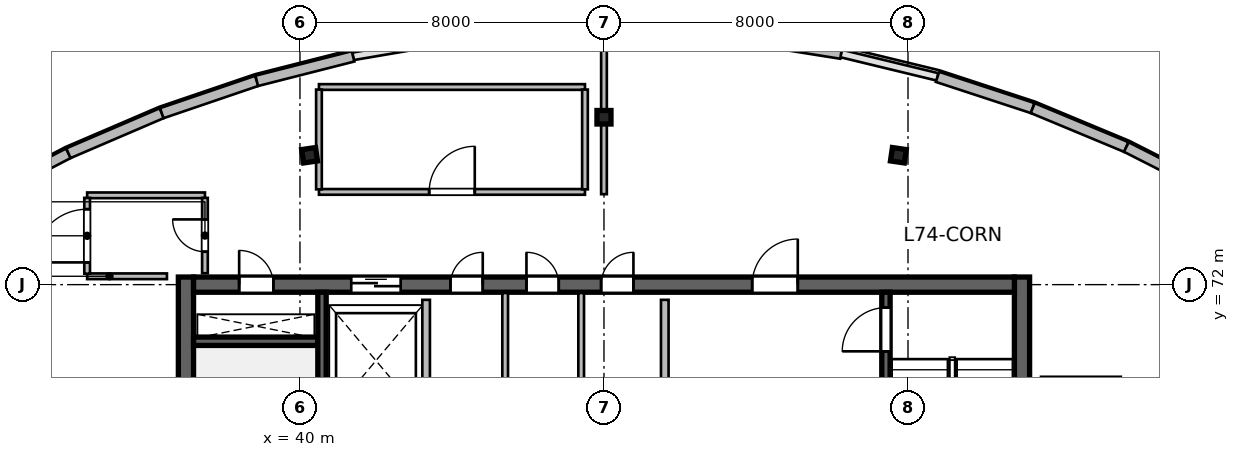
"""IFC4 building model, lengths in metres.
Left out: names, types, materials, properties, quantities, classifications, styles, units other than length and angle.
Written with IfcOpenShell. Run it as: python <this file> out.ifc"""

import sys

from ifc_helpers import new_model, si_unit, direction, frame, frame_2d, origin, origin_2d, place, context, subcontext, project, spatial, rectangle, i_section, extrude, source, transform, mapped, element, fill, save


model = new_model("IFC4")
c1 = context("Model", 3, precision=1e-05, world=origin(), true_north=direction((0.0, 1.0)))
c2 = subcontext(c1, "Body", "Model", "MODEL_VIEW")
j1 = project(units=[si_unit("LENGTHUNIT", "METRE"), si_unit("PLANEANGLEUNIT", "RADIAN")], contexts=[c1])
p1 = place(None, origin())
s1 = spatial("IfcSite", under=j1, at=p1, CompositionType="ELEMENT")
p2 = place(p1, origin())
s2 = spatial("IfcBuilding", under=s1, at=p2, CompositionType="ELEMENT")
p3 = place(p2, frame((0.0, 0.0, 303.0)))
s3 = spatial("IfcBuildingStorey", under=s2, at=p3, CompositionType="ELEMENT", Elevation=303.0)
m1 = source(origin(), c2, "Body", "SweptSolid", [
    extrude(rectangle(XDim=12.0, YDim=0.4, at=frame_2d((6.0, 0.0))), origin(), (0.0, 0.0, 1.0), 4.8),
])
for number, where, z_axis, x_axis in (
    (1, (37.0, 60.2, 0.0), (0.0, 0.0, 1.0), (0.0, 1.0, 0.0)),
    (2, (59.0, 60.2, 0.0), (0.0, 0.0, 1.0), (0.0, 1.0, 0.0)),
):
    element("IfcWall", number, at=place(p3, frame(where, z_axis=z_axis, x_axis=x_axis)), inside=s3, PredefinedType="SHEAR", context=c2, shape_type="MappedRepresentation", body=[
        mapped(m1, transform((0.0, 0.0, 0.0), scale=1.0)),
    ])
m2 = source(origin(), c2, "Body", "SweptSolid", [
    extrude(rectangle(XDim=21.6, YDim=0.4, at=frame_2d((10.8, 0.0))), origin(), (0.0, 0.0, 1.0), 4.8),
])
p4 = place(p3, frame((37.2, 72.0, 0.0), z_axis=(0.0, 0.0, 1.0), x_axis=(1.0, 0.0, 0.0)))
e3 = element("IfcWall", 3, at=p4, inside=s3, PredefinedType="SHEAR", context=c2, shape_type="MappedRepresentation", body=[
    mapped(m2, transform((0.0, 0.0, 0.0), scale=1.0)),
])
p5 = place(p4, frame((1.2, 0.0, 0.0)))
e4 = element("IfcOpeningElement", 4, at=p5, cuts=e3, PredefinedType="OPENING", context=c2, shape_type="SweptSolid", body=[
    extrude(rectangle(XDim=0.9, YDim=2.1, at=frame_2d((0.45, 1.05))), frame((0.0, 0.21, 0.0), z_axis=(0.0, -1.0, 0.0), x_axis=(1.0, 0.0, 0.0)), (0.0, 0.0, 1.0), 0.42),
])
p6 = place(p4, frame((14.7, 0.0, 0.0)))
e5 = element("IfcOpeningElement", 5, at=p6, cuts=e3, PredefinedType="OPENING", context=c2, shape_type="SweptSolid", body=[
    extrude(rectangle(XDim=1.2, YDim=2.15, at=frame_2d((0.6, 1.075))), frame((0.0, 0.21, 0.0), z_axis=(0.0, -1.0, 0.0), x_axis=(1.0, 0.0, 0.0)), (0.0, 0.0, 1.0), 0.42),
])
p7 = place(p4, frame((4.15, 0.0, 0.0)))
e6 = element("IfcOpeningElement", 6, at=p7, cuts=e3, PredefinedType="OPENING", context=c2, shape_type="SweptSolid", body=[
    extrude(rectangle(XDim=1.3, YDim=2.15, at=frame_2d((0.65, 1.075))), frame((0.0, 0.21, 0.0), z_axis=(0.0, -1.0, 0.0), x_axis=(1.0, 0.0, 0.0)), (0.0, 0.0, 1.0), 0.42),
])
p8 = place(p4, frame((6.76, 0.0, 0.0)))
e7 = element("IfcOpeningElement", 7, at=p8, cuts=e3, PredefinedType="OPENING", context=c2, shape_type="SweptSolid", body=[
    extrude(rectangle(XDim=0.85, YDim=2.1, at=frame_2d((0.425, 1.05))), frame((0.0, 0.21, 0.0), z_axis=(0.0, -1.0, 0.0), x_axis=(1.0, 0.0, 0.0)), (0.0, 0.0, 1.0), 0.42),
])
p9 = place(p4, frame((8.76, 0.0, 0.0)))
e8 = element("IfcOpeningElement", 8, at=p9, cuts=e3, PredefinedType="OPENING", context=c2, shape_type="SweptSolid", body=[
    extrude(rectangle(XDim=0.85, YDim=2.1, at=frame_2d((0.425, 1.05))), frame((0.0, 0.21, 0.0), z_axis=(0.0, -1.0, 0.0), x_axis=(1.0, 0.0, 0.0)), (0.0, 0.0, 1.0), 0.42),
])
p10 = place(p4, frame((10.725, 0.0, 0.0)))
e9 = element("IfcOpeningElement", 9, at=p10, cuts=e3, PredefinedType="OPENING", context=c2, shape_type="SweptSolid", body=[
    extrude(rectangle(XDim=0.85, YDim=2.1, at=frame_2d((0.425, 1.05))), frame((0.0, 0.21, 0.0), z_axis=(0.0, -1.0, 0.0), x_axis=(1.0, 0.0, 0.0)), (0.0, 0.0, 1.0), 0.42),
])
m3 = source(origin(), c2, "Body", "SweptSolid", [
    extrude(rectangle(XDim=3.27, YDim=0.22, at=frame_2d((1.635, 0.0))), origin(), (0.0, 0.0, 1.0), 4.8),
])
p11 = place(p3, frame((37.2, 70.51, 0.0), z_axis=(0.0, 0.0, 1.0), x_axis=(1.0, 0.0, 0.0)))
e10 = element("IfcWall", 10, at=p11, inside=s3, PredefinedType="SHEAR", context=c2, shape_type="MappedRepresentation", body=[
    mapped(m3, transform((0.0, 0.0, 0.0), scale=1.0)),
])
m4 = source(origin(), c2, "Body", "SweptSolid", [
    extrude(rectangle(XDim=11.2, YDim=0.22, at=frame_2d((5.6, 0.0))), origin(), (0.0, 0.0, 1.0), 4.8),
])
p12 = place(p3, frame((40.58, 60.6, 0.0), z_axis=(0.0, 0.0, 1.0), x_axis=(0.0, 1.0, 0.0)))
e11 = element("IfcWall", 11, at=p12, inside=s3, PredefinedType="SHEAR", context=c2, shape_type="MappedRepresentation", body=[
    mapped(m4, transform((0.0, 0.0, 0.0), scale=1.0)),
])
p13 = place(p3, frame((55.42, 60.6, 0.0), z_axis=(0.0, 0.0, 1.0), x_axis=(0.0, 1.0, 0.0)))
e12 = element("IfcWall", 12, at=p13, inside=s3, PredefinedType="SHEAR", context=c2, shape_type="MappedRepresentation", body=[
    mapped(m4, transform((0.0, 0.0, 0.0), scale=1.0)),
])
p14 = place(p13, frame((9.645, 0.0, 0.0)))
e13 = element("IfcOpeningElement", 13, at=p14, cuts=e12, PredefinedType="OPENING", context=c2, shape_type="SweptSolid", body=[
    extrude(rectangle(XDim=1.15, YDim=2.15, at=frame_2d((0.575, 1.075))), frame((0.0, 0.12, 0.0), z_axis=(0.0, -1.0, 0.0), x_axis=(1.0, 0.0, 0.0)), (0.0, 0.0, 1.0), 0.24),
])
m5 = source(origin(), c2, "Body", "SweptSolid", [
    extrude(i_section(OverallWidth=0.369, OverallDepth=0.356, WebThickness=0.011, FlangeThickness=0.018, at=origin_2d()), origin(), (0.0, 0.0, 1.0), 4.8),
])
for number, where, z_axis, x_axis in (
    (14, (40.253, 75.404, 0.0), (0.0, 0.0, 1.0), (-0.143, 0.99, 0.0)),
    (15, (48.0, 76.404, 0.0), (0.0, 0.0, 1.0), (0.0, 1.0, 0.0)),
    (16, (55.747, 75.404, 0.0), (0.0, 0.0, 1.0), (0.143, 0.99, 0.0)),
):
    element("IfcColumn", number, at=place(p3, frame(where, z_axis=z_axis, x_axis=x_axis)), inside=s3, PredefinedType="COLUMN", context=c2, shape_type="MappedRepresentation", body=[
        mapped(m5, transform((0.0, 0.0, 0.0), scale=1.0)),
    ])
m6 = source(origin(), c2, "Body", "SweptSolid", [
    extrude(rectangle(XDim=2.711, YDim=0.28, at=frame_2d((1.356, 0.0))), origin(), (0.0, 0.0, 1.0), 4.54),
])
p15 = place(p3, frame((31.502, 74.205, 0.0), z_axis=(0.0, 0.0, 1.0), x_axis=(0.886828760751, 0.462098202881, 0.0)))
e17 = element("IfcWall", 17, at=p15, inside=s3, PredefinedType="SOLIDWALL", context=c2, shape_type="MappedRepresentation", body=[
    mapped(m6, transform((0.0, 0.0, 0.0), scale=1.0)),
])
m7 = source(origin(), c2, "Body", "SweptSolid", [
    extrude(rectangle(XDim=2.673, YDim=0.28, at=frame_2d((1.337, 0.0))), origin(), (0.0, 0.0, 1.0), 4.54),
])
p16 = place(p3, frame((33.907, 75.458, 0.0), z_axis=(0.0, 0.0, 1.0), x_axis=(0.919036345912, 0.394172798266, 0.0)))
e18 = element("IfcWall", 18, at=p16, inside=s3, PredefinedType="SOLIDWALL", context=c2, shape_type="MappedRepresentation", body=[
    mapped(m7, transform((0.0, 0.0, 0.0), scale=1.0)),
])
m8 = source(origin(), c2, "Body", "SweptSolid", [
    extrude(rectangle(XDim=2.64, YDim=0.28, at=frame_2d((1.32, 0.0))), origin(), (0.0, 0.0, 1.0), 4.54),
])
p17 = place(p3, frame((36.364, 76.511, 0.0), z_axis=(0.0, 0.0, 1.0), x_axis=(0.946685911962, 0.322158011064, 0.0)))
e19 = element("IfcWall", 19, at=p17, inside=s3, PredefinedType="SOLIDWALL", context=c2, shape_type="MappedRepresentation", body=[
    mapped(m8, transform((0.0, 0.0, 0.0), scale=1.0)),
])
m9 = source(origin(), c2, "Body", "SweptSolid", [
    extrude(rectangle(XDim=2.614, YDim=0.28, at=frame_2d((1.307, 0.0))), origin(), (0.0, 0.0, 1.0), 4.54),
])
p18 = place(p3, frame((38.863, 77.362, 0.0), z_axis=(0.0, 0.0, 1.0), x_axis=(0.969106509315, 0.246642602978, 0.0)))
e20 = element("IfcWall", 20, at=p18, inside=s3, PredefinedType="SOLIDWALL", context=c2, shape_type="MappedRepresentation", body=[
    mapped(m9, transform((0.0, 0.0, 0.0), scale=1.0)),
])
m10 = source(origin(), c2, "Body", "SweptSolid", [
    extrude(rectangle(XDim=2.593, YDim=0.28, at=frame_2d((1.296, 0.0))), origin(), (0.0, 0.0, 1.0), 4.54),
])
p19 = place(p3, frame((51.679, 78.488, 0.0), z_axis=(0.0, 0.0, 1.0), x_axis=(0.987661204406, -0.156605700126, 0.0)))
e21 = element("IfcWall", 21, at=p19, inside=s3, PredefinedType="SOLIDWALL", context=c2, shape_type="MappedRepresentation", body=[
    mapped(m10, transform((0.0, 0.0, 0.0), scale=1.0)),
])
m11 = source(origin(), c2, "Body", "SweptSolid", [
    extrude(rectangle(XDim=2.636, YDim=0.28, at=frame_2d((1.318, 0.0))), origin(), (0.0, 0.0, 1.0), 4.54),
])
p20 = place(p3, frame((56.777, 77.467, 0.0), z_axis=(0.0, 0.0, 1.0), x_axis=(0.950200321617, -0.311639774097, 0.0)))
e22 = element("IfcWall", 22, at=p20, inside=s3, PredefinedType="SOLIDWALL", context=c2, shape_type="MappedRepresentation", body=[
    mapped(m11, transform((0.0, 0.0, 0.0), scale=1.0)),
])
m12 = source(origin(), c2, "Body", "SweptSolid", [
    extrude(rectangle(XDim=2.668, YDim=0.28, at=frame_2d((1.334, 0.0))), origin(), (0.0, 0.0, 1.0), 4.54),
])
p21 = place(p3, frame((59.281, 76.645, 0.0), z_axis=(0.0, 0.0, 1.0), x_axis=(0.923290633029, -0.384102078828, 0.0)))
e23 = element("IfcWall", 23, at=p21, inside=s3, PredefinedType="SOLIDWALL", context=c2, shape_type="MappedRepresentation", body=[
    mapped(m12, transform((0.0, 0.0, 0.0), scale=1.0)),
])
m13 = source(origin(), c2, "Body", "SweptSolid", [
    extrude(rectangle(XDim=2.706, YDim=0.28, at=frame_2d((1.353, 0.0))), origin(), (0.0, 0.0, 1.0), 4.54),
])
p22 = place(p3, frame((61.745, 75.62, 0.0), z_axis=(0.0, 0.0, 1.0), x_axis=(0.891648836287, -0.452727680564, 0.0)))
e24 = element("IfcWall", 24, at=p22, inside=s3, PredefinedType="SOLIDWALL", context=c2, shape_type="MappedRepresentation", body=[
    mapped(m13, transform((0.0, 0.0, 0.0), scale=1.0)),
])
m14 = source(origin(), c2, "Body", "SweptSolid", [
    extrude(rectangle(XDim=5.8, YDim=0.2, at=frame_2d((2.9, 0.0))), origin(), (0.0, 0.0, 1.0), 4.54),
])
p23 = place(p3, frame((49.6, 65.8, 0.0), z_axis=(0.0, 0.0, 1.0), x_axis=(0.0, 1.0, 0.0)))
e25 = element("IfcWall", 25, at=p23, inside=s3, PredefinedType="SOLIDWALL", context=c2, shape_type="MappedRepresentation", body=[
    mapped(m14, transform((0.0, 0.0, 0.0), scale=1.0)),
])
m15 = source(origin(), c2, "Body", "SweptSolid", [
    extrude(rectangle(XDim=3.2, YDim=0.2, at=frame_2d((1.6, 0.0))), origin(), (0.0, 0.0, 1.0), 4.54),
])
p24 = place(p3, frame((43.32, 68.4, 0.0), z_axis=(0.0, 0.0, 1.0), x_axis=(0.0, 1.0, 0.0)))
e26 = element("IfcWall", 26, at=p24, inside=s3, PredefinedType="SOLIDWALL", context=c2, shape_type="MappedRepresentation", body=[
    mapped(m15, transform((0.0, 0.0, 0.0), scale=1.0)),
])
m16 = source(origin(), c2, "Body", "SweptSolid", [
    extrude(rectangle(XDim=3.38, YDim=0.15, at=frame_2d((1.69, 0.0))), origin(), (0.0, 0.0, 1.0), 4.54),
])
for number, where, z_axis, x_axis in (
    (27, (45.4, 68.4, 0.0), (0.0, 0.0, 1.0), (0.0, 1.0, 0.0)),
    (28, (47.4, 68.4, 0.0), (0.0, 0.0, 1.0), (0.0, 1.0, 0.0)),
):
    element("IfcWall", number, at=place(p3, frame(where, z_axis=z_axis, x_axis=x_axis)), inside=s3, PredefinedType="PARTITIONING", context=c2, shape_type="MappedRepresentation", body=[
        mapped(m16, transform((0.0, 0.0, 0.0), scale=1.0)),
    ])
m17 = source(origin(), c2, "Body", "SweptSolid", [
    extrude(rectangle(XDim=2.1, YDim=0.15, at=frame_2d((1.05, 0.0))), origin(), (0.0, 0.0, 1.0), 4.54),
])
p25 = place(p3, frame((34.4, 72.22, 0.0), z_axis=(0.0, 0.0, 1.0), x_axis=(1.0, 0.0, 0.0)))
e29 = element("IfcWall", 29, at=p25, inside=s3, PredefinedType="PARTITIONING", context=c2, shape_type="MappedRepresentation", body=[
    mapped(m17, transform((0.0, 0.0, 0.0), scale=1.0)),
])
m18 = source(origin(), c2, "Body", "SweptSolid", [
    extrude(rectangle(XDim=3.1, YDim=0.15, at=frame_2d((1.55, 0.0))), origin(), (0.0, 0.0, 1.0), 3.971),
])
p26 = place(p3, frame((34.4, 74.35, 0.0), z_axis=(0.0, 0.0, 1.0), x_axis=(1.0, 0.0, 0.0)))
e30 = element("IfcWall", 30, at=p26, inside=s3, PredefinedType="PARTITIONING", context=c2, shape_type="MappedRepresentation", body=[
    mapped(m18, transform((0.0, 0.0, 0.0), scale=1.0)),
])
m19 = source(origin(), c2, "Body", "SweptSolid", [
    extrude(rectangle(XDim=1.995, YDim=0.15, at=frame_2d((0.998, 0.0))), origin(), (0.0, 0.0, 1.0), 4.54),
])
p27 = place(p3, frame((34.4, 72.288, 0.0), z_axis=(0.0, 0.0, 1.0), x_axis=(0.0, 1.0, 0.0)))
e31 = element("IfcWall", 31, at=p27, inside=s3, PredefinedType="PARTITIONING", context=c2, shape_type="MappedRepresentation", body=[
    mapped(m19, transform((0.0, 0.0, 0.0), scale=1.0)),
])
p28 = place(p27, frame((0.298, 0.0, 0.0)))
e32 = element("IfcOpeningElement", 32, at=p28, cuts=e31, PredefinedType="OPENING", context=c2, shape_type="SweptSolid", body=[
    extrude(rectangle(XDim=1.4, YDim=2.15, at=frame_2d((0.7, 1.075))), frame((0.0, 0.085, 0.0), z_axis=(0.0, -1.0, 0.0), x_axis=(1.0, 0.0, 0.0)), (0.0, 0.0, 1.0), 0.17),
])
m20 = source(origin(), c2, "Body", "SweptSolid", [
    extrude(rectangle(XDim=1.982, YDim=0.15, at=frame_2d((0.991, 0.0))), origin(), (0.0, 0.0, 1.0), 4.54),
])
p29 = place(p3, frame((37.5, 72.3, 0.0), z_axis=(0.0, 0.0, 1.0), x_axis=(0.0, 1.0, 0.0)))
e33 = element("IfcWall", 33, at=p29, inside=s3, PredefinedType="PARTITIONING", context=c2, shape_type="MappedRepresentation", body=[
    mapped(m20, transform((0.0, 0.0, 0.0), scale=1.0)),
])
p30 = place(p29, frame((0.566, 0.0, 0.0)))
e34 = element("IfcOpeningElement", 34, at=p30, cuts=e33, PredefinedType="OPENING", context=c2, shape_type="SweptSolid", body=[
    extrude(rectangle(XDim=0.85, YDim=2.1, at=frame_2d((0.425, 1.05))), frame((0.0, 0.085, 0.0), z_axis=(0.0, -1.0, 0.0), x_axis=(1.0, 0.0, 0.0)), (0.0, 0.0, 1.0), 0.17),
])
m21 = source(origin(), c2, "Body", "SweptSolid", [
    extrude(rectangle(XDim=7.0, YDim=0.15, at=frame_2d((3.5, 0.0))), origin(), (0.0, 0.0, 1.0), 4.54),
])
p31 = place(p3, frame((40.5, 74.44, 0.0), z_axis=(0.0, 0.0, 1.0), x_axis=(1.0, 0.0, 0.0)))
e35 = element("IfcWall", 35, at=p31, inside=s3, PredefinedType="PARTITIONING", context=c2, shape_type="MappedRepresentation", body=[
    mapped(m21, transform((0.0, 0.0, 0.0), scale=1.0)),
])
p32 = place(p31, frame((2.9, 0.0, 0.0)))
e36 = element("IfcOpeningElement", 36, at=p32, cuts=e35, PredefinedType="OPENING", context=c2, shape_type="SweptSolid", body=[
    extrude(rectangle(XDim=1.2, YDim=2.15, at=frame_2d((0.6, 1.075))), frame((0.0, 0.085, 0.0), z_axis=(0.0, -1.0, 0.0), x_axis=(1.0, 0.0, 0.0)), (0.0, 0.0, 1.0), 0.17),
])
p33 = place(p3, frame((40.5, 77.2, 0.0), z_axis=(0.0, 0.0, 1.0), x_axis=(1.0, 0.0, 0.0)))
e37 = element("IfcWall", 37, at=p33, inside=s3, PredefinedType="PARTITIONING", context=c2, shape_type="MappedRepresentation", body=[
    mapped(m21, transform((0.0, 0.0, 0.0), scale=1.0)),
])
m22 = source(origin(), c2, "Body", "SweptSolid", [
    extrude(rectangle(XDim=2.625, YDim=0.15, at=frame_2d((1.312, 0.0))), origin(), (0.0, 0.0, 1.0), 4.54),
])
for number, where, z_axis, x_axis in (
    (38, (40.5, 74.508, 0.0), (0.0, 0.0, 1.0), (0.0, 1.0, 0.0)),
    (39, (47.5, 74.508, 0.0), (0.0, 0.0, 1.0), (0.0, 1.0, 0.0)),
):
    element("IfcWall", number, at=place(p3, frame(where, z_axis=z_axis, x_axis=x_axis)), inside=s3, PredefinedType="PARTITIONING", context=c2, shape_type="MappedRepresentation", body=[
        mapped(m22, transform((0.0, 0.0, 0.0), scale=1.0)),
    ])
m23 = source(origin(), c2, "Body", "SweptSolid", [
    extrude(rectangle(XDim=4.287, YDim=0.15, at=frame_2d((2.144, 0.0))), origin(), (0.0, 0.0, 1.0), 4.214),
])
p34 = place(p3, frame((48.0, 74.38, 0.0), z_axis=(0.0, 0.0, 1.0), x_axis=(0.0, 1.0, 0.0)))
e40 = element("IfcWall", 40, at=p34, inside=s3, PredefinedType="PARTITIONING", context=c2, shape_type="MappedRepresentation", body=[
    mapped(m23, transform((0.0, 0.0, 0.0), scale=1.0)),
])
m24 = source(origin(), c2, "Body", "SweptSolid", [
    extrude(rectangle(XDim=0.9, YDim=2.1, at=frame_2d((0.45, 1.05))), frame((0.0, 0.025, 0.0), z_axis=(0.0, -1.0, 0.0), x_axis=(1.0, 0.0, 0.0)), (0.0, 0.0, 1.0), 0.05),
])
p35 = place(p5, origin())
e41 = element("IfcDoor", 41, at=p35, inside=s3, OperationType="SINGLE_SWING_LEFT", PredefinedType="DOOR", context=c2, shape_type="MappedRepresentation", body=[
    mapped(m24, transform((0.0, 0.0, 0.0), scale=1.0)),
])
fill(e4, e41)
m25 = source(origin(), c2, "Body", "SweptSolid", [
    extrude(rectangle(XDim=1.15, YDim=2.15, at=frame_2d((0.575, 1.075))), frame((0.0, 0.025, 0.0), z_axis=(0.0, -1.0, 0.0), x_axis=(1.0, 0.0, 0.0)), (0.0, 0.0, 1.0), 0.05),
])
p36 = place(p14, origin())
e42 = element("IfcDoor", 42, at=p36, inside=s3, OperationType="SINGLE_SWING_LEFT", PredefinedType="DOOR", context=c2, shape_type="MappedRepresentation", body=[
    mapped(m25, transform((0.0, 0.0, 0.0), scale=1.0)),
])
fill(e13, e42)
m26 = source(origin(), c2, "Body", "SweptSolid", [
    extrude(rectangle(XDim=1.2, YDim=2.15, at=frame_2d((0.6, 1.075))), frame((0.0, 0.025, 0.0), z_axis=(0.0, -1.0, 0.0), x_axis=(1.0, 0.0, 0.0)), (0.0, 0.0, 1.0), 0.05),
])
p37 = place(p6, origin())
e43 = element("IfcDoor", 43, at=p37, inside=s3, OperationType="SINGLE_SWING_RIGHT", PredefinedType="DOOR", context=c2, shape_type="MappedRepresentation", body=[
    mapped(m26, transform((0.0, 0.0, 0.0), scale=1.0)),
])
fill(e5, e43)
m27 = source(origin(), c2, "Body", "SweptSolid", [
    extrude(rectangle(XDim=1.3, YDim=2.15, at=frame_2d((0.65, 1.075))), frame((0.0, 0.025, 0.0), z_axis=(0.0, -1.0, 0.0), x_axis=(1.0, 0.0, 0.0)), (0.0, 0.0, 1.0), 0.05),
])
p38 = place(p7, origin())
e44 = element("IfcDoor", 44, at=p38, inside=s3, OperationType="DOUBLE_DOOR_SLIDING", PredefinedType="DOOR", context=c2, shape_type="MappedRepresentation", body=[
    mapped(m27, transform((0.0, 0.0, 0.0), scale=1.0)),
])
fill(e6, e44)
m28 = source(origin(), c2, "Body", "SweptSolid", [
    extrude(rectangle(XDim=0.85, YDim=2.1, at=frame_2d((0.425, 1.05))), frame((0.0, 0.025, 0.0), z_axis=(0.0, -1.0, 0.0), x_axis=(1.0, 0.0, 0.0)), (0.0, 0.0, 1.0), 0.05),
])
p39 = place(p8, origin())
e45 = element("IfcDoor", 45, at=p39, inside=s3, OperationType="SINGLE_SWING_RIGHT", PredefinedType="DOOR", context=c2, shape_type="MappedRepresentation", body=[
    mapped(m28, transform((0.0, 0.0, 0.0), scale=1.0)),
])
fill(e7, e45)
p40 = place(p9, origin())
e46 = element("IfcDoor", 46, at=p40, inside=s3, OperationType="SINGLE_SWING_LEFT", PredefinedType="DOOR", context=c2, shape_type="MappedRepresentation", body=[
    mapped(m28, transform((0.0, 0.0, 0.0), scale=1.0)),
])
fill(e8, e46)
p41 = place(p10, origin())
e47 = element("IfcDoor", 47, at=p41, inside=s3, OperationType="SINGLE_SWING_RIGHT", PredefinedType="DOOR", context=c2, shape_type="MappedRepresentation", body=[
    mapped(m28, transform((0.0, 0.0, 0.0), scale=1.0)),
])
fill(e9, e47)
p42 = place(p30, origin())
e48 = element("IfcDoor", 48, at=p42, inside=s3, OperationType="SINGLE_SWING_RIGHT", PredefinedType="DOOR", context=c2, shape_type="MappedRepresentation", body=[
    mapped(m28, transform((0.0, 0.0, 0.0), scale=1.0)),
])
fill(e34, e48)
m29 = source(origin(), c2, "Body", "SweptSolid", [
    extrude(rectangle(XDim=1.2, YDim=2.15, at=frame_2d((0.6, 1.075))), frame((0.0, 0.025, 0.0), z_axis=(0.0, -1.0, 0.0), x_axis=(1.0, 0.0, 0.0)), (0.0, 0.0, 1.0), 0.05),
])
p43 = place(p32, origin())
e49 = element("IfcDoor", 49, at=p43, inside=s3, OperationType="SINGLE_SWING_RIGHT", PredefinedType="DOOR", context=c2, shape_type="MappedRepresentation", body=[
    mapped(m29, transform((0.0, 0.0, 0.0), scale=1.0)),
])
fill(e36, e49)
m30 = source(origin(), c2, "Body", "SweptSolid", [
    extrude(rectangle(XDim=1.4, YDim=2.15, at=frame_2d((0.7, 1.075))), frame((0.0, 0.025, 0.0), z_axis=(0.0, -1.0, 0.0), x_axis=(1.0, 0.0, 0.0)), (0.0, 0.0, 1.0), 0.05),
])
p44 = place(p28, origin())
e50 = element("IfcDoor", 50, at=p44, inside=s3, OperationType="SINGLE_SWING_LEFT", PredefinedType="DOOR", context=c2, shape_type="MappedRepresentation", body=[
    mapped(m30, transform((0.0, 0.0, 0.0), scale=1.0)),
])
fill(e32, e50)
save(model, sys.argv[1])
